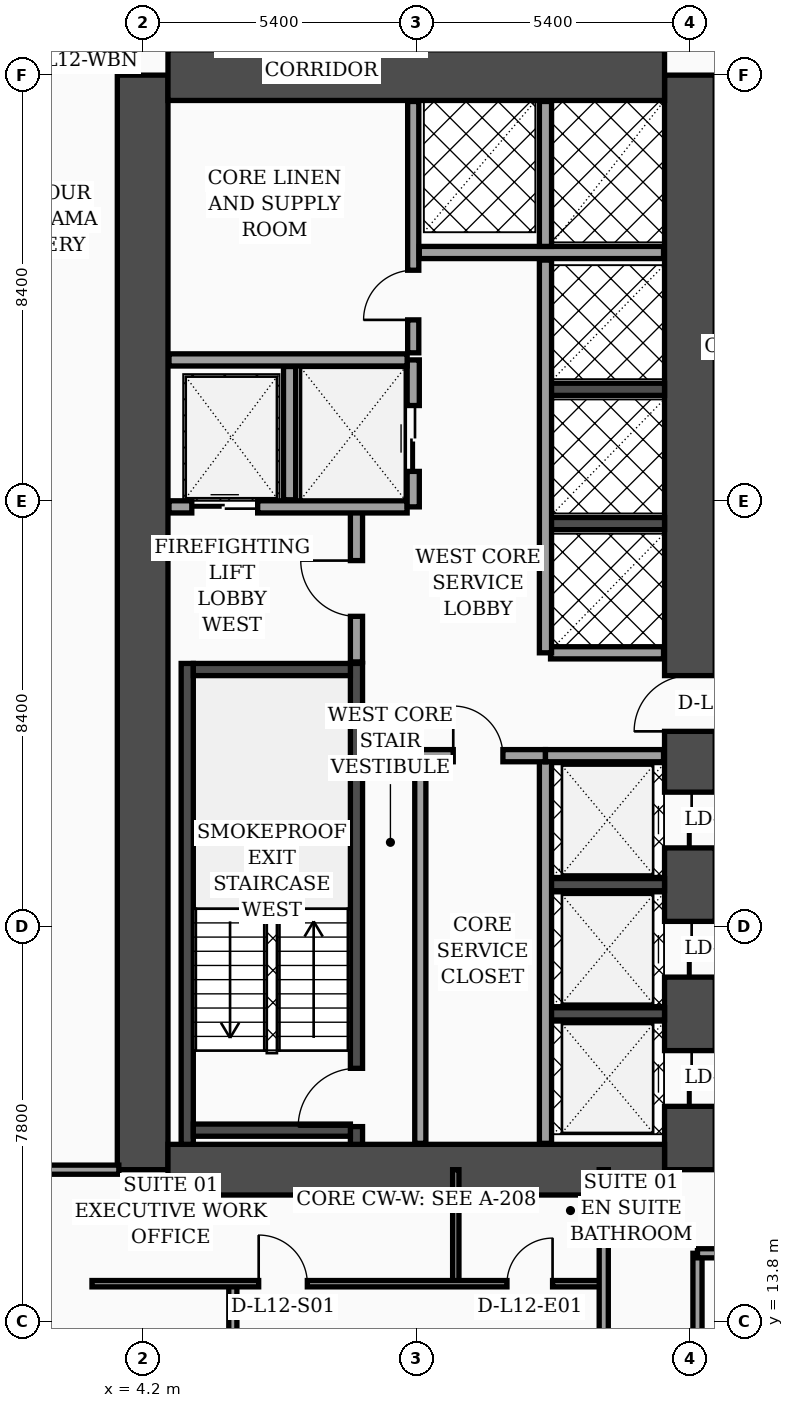
"""IFC4 building model, lengths in metres.
Left out: names, types, materials, properties, quantities, classifications, styles, units other than length and angle.
Written with IfcOpenShell. Run it as: python <this file> out.ifc"""

import sys

from ifc_helpers import new_model, si_unit, direction, frame, frame_2d, origin, place, context, subcontext, project, spatial, rectangle, extrude, element, fill, save


model = new_model("IFC4")
c1 = context("Model", 3, precision=1e-05, world=origin(), true_north=direction((0.0, 1.0)))
c2 = subcontext(c1, "Body", "Model", "MODEL_VIEW")
j1 = project(units=[si_unit("LENGTHUNIT", "METRE"), si_unit("PLANEANGLEUNIT", "RADIAN")], contexts=[c1])
p1 = place(None, origin())
s1 = spatial("IfcSite", under=j1, at=p1, CompositionType="ELEMENT")
p2 = place(p1, origin())
s2 = spatial("IfcBuilding", under=s1, at=p2, CompositionType="ELEMENT")
p3 = place(p2, frame((0.0, 0.0, 54.6)))
s3 = spatial("IfcBuildingStorey", under=s2, at=p3, CompositionType="ELEMENT", Elevation=54.6)
p4 = place(p3, frame((4.2, 16.8, 0.0), z_axis=(0.0, 0.0, 1.0), x_axis=(0.0, 1.0, 0.0)))
e1 = element("IfcWall", 1, at=p4, inside=s3, PredefinedType="SHEAR", context=c2, shape_type="SweptSolid", body=[
    extrude(rectangle(XDim=21.6, YDim=1.0, at=frame_2d((10.8, 0.0))), origin(), (0.0, 0.0, 1.0), 3.56),
])
p5 = place(p3, frame((15.0, 16.8, 0.0), z_axis=(0.0, 0.0, 1.0), x_axis=(0.0, 1.0, 0.0)))
e2 = element("IfcWall", 2, at=p5, inside=s3, PredefinedType="SHEAR", context=c2, shape_type="SweptSolid", body=[
    extrude(rectangle(XDim=21.6, YDim=1.0, at=frame_2d((10.8, 0.0))), origin(), (0.0, 0.0, 1.0), 3.56),
])
p6 = place(p5, frame((8.65, 0.0, 0.0)))
e3 = element("IfcOpeningElement", 3, at=p6, cuts=e2, PredefinedType="OPENING", context=c2, shape_type="SweptSolid", body=[
    extrude(rectangle(XDim=1.1, YDim=2.2, at=frame_2d((0.55, 1.1))), frame((0.0, 0.51, 0.0), z_axis=(0.0, -1.0, 0.0), x_axis=(1.0, 0.0, 0.0)), (0.0, 0.0, 1.0), 1.02),
])
p7 = place(p5, frame((1.25, 0.0, 0.0)))
e4 = element("IfcOpeningElement", 4, at=p7, cuts=e2, PredefinedType="OPENING", context=c2, shape_type="SweptSolid", body=[
    extrude(rectangle(XDim=1.1, YDim=2.2, at=frame_2d((0.55, 1.1))), frame((0.0, 0.51, 0.0), z_axis=(0.0, -1.0, 0.0), x_axis=(1.0, 0.0, 0.0)), (0.0, 0.0, 1.0), 1.02),
])
p8 = place(p5, frame((3.8, 0.0, 0.0)))
e5 = element("IfcOpeningElement", 5, at=p8, cuts=e2, PredefinedType="OPENING", context=c2, shape_type="SweptSolid", body=[
    extrude(rectangle(XDim=1.1, YDim=2.2, at=frame_2d((0.55, 1.1))), frame((0.0, 0.51, 0.0), z_axis=(0.0, -1.0, 0.0), x_axis=(1.0, 0.0, 0.0)), (0.0, 0.0, 1.0), 1.02),
])
p9 = place(p5, frame((6.35, 0.0, 0.0)))
e6 = element("IfcOpeningElement", 6, at=p9, cuts=e2, PredefinedType="OPENING", context=c2, shape_type="SweptSolid", body=[
    extrude(rectangle(XDim=1.1, YDim=2.2, at=frame_2d((0.55, 1.1))), frame((0.0, 0.51, 0.0), z_axis=(0.0, -1.0, 0.0), x_axis=(1.0, 0.0, 0.0)), (0.0, 0.0, 1.0), 1.02),
])
for number, where, z_axis, x_axis in (
    (7, (4.7, 38.4, 0.0), (0.0, 0.0, 1.0), (1.0, 0.0, 0.0)),
    (8, (4.7, 16.8, 0.0), (0.0, 0.0, 1.0), (1.0, 0.0, 0.0)),
):
    element("IfcWall", number, at=place(p3, frame(where, z_axis=z_axis, x_axis=x_axis)), inside=s3, PredefinedType="SHEAR", context=c2, shape_type="SweptSolid", body=[
        extrude(rectangle(XDim=9.8, YDim=1.0, at=frame_2d((4.9, 0.0))), origin(), (0.0, 0.0, 1.0), 3.56),
    ])
p10 = place(p3, frame((5.08, 17.3, 0.0), z_axis=(0.0, 0.0, 1.0), x_axis=(0.0, 1.0, 0.0)))
e9 = element("IfcWall", 9, at=p10, inside=s3, PredefinedType="SOLIDWALL", context=c2, shape_type="SweptSolid", body=[
    extrude(rectangle(XDim=9.49, YDim=0.24, at=frame_2d((4.745, 0.0))), origin(), (0.0, 0.0, 1.0), 3.56),
])
p11 = place(p3, frame((8.42, 17.3, 0.0), z_axis=(0.0, 0.0, 1.0), x_axis=(0.0, 1.0, 0.0)))
e10 = element("IfcWall", 10, at=p11, inside=s3, PredefinedType="SOLIDWALL", context=c2, shape_type="SweptSolid", body=[
    extrude(rectangle(XDim=9.49, YDim=0.24, at=frame_2d((4.745, 0.0))), origin(), (0.0, 0.0, 1.0), 3.56),
])
p12 = place(p11, frame((0.35, 0.0, 0.0)))
e11 = element("IfcOpeningElement", 11, at=p12, cuts=e10, PredefinedType="OPENING", context=c2, shape_type="SweptSolid", body=[
    extrude(rectangle(XDim=1.15, YDim=2.2, at=frame_2d((0.575, 1.1))), frame((0.0, 0.13, 0.0), z_axis=(0.0, -1.0, 0.0), x_axis=(1.0, 0.0, 0.0)), (0.0, 0.0, 1.0), 0.26),
])
for number, where, z_axis, x_axis in (
    (12, (5.2, 17.58, 0.0), (0.0, 0.0, 1.0), (1.0, 0.0, 0.0)),
    (13, (5.2, 26.67, 0.0), (0.0, 0.0, 1.0), (1.0, 0.0, 0.0)),
):
    element("IfcWall", number, at=place(p3, frame(where, z_axis=z_axis, x_axis=x_axis)), inside=s3, PredefinedType="SOLIDWALL", context=c2, shape_type="SweptSolid", body=[
        extrude(rectangle(XDim=3.1, YDim=0.24, at=frame_2d((1.55, 0.0))), origin(), (0.0, 0.0, 1.0), 3.56),
    ])
for number, where, z_axis, x_axis in (
    (14, (12.18, 19.875, 0.0), (0.0, 0.0, 1.0), (1.0, 0.0, 0.0)),
    (15, (12.18, 22.425, 0.0), (0.0, 0.0, 1.0), (1.0, 0.0, 0.0)),
    (16, (12.18, 29.55, 0.0), (0.0, 0.0, 1.0), (1.0, 0.0, 0.0)),
    (17, (12.18, 32.2, 0.0), (0.0, 0.0, 1.0), (1.0, 0.0, 0.0)),
):
    element("IfcWall", number, at=place(p3, frame(where, z_axis=z_axis, x_axis=x_axis)), inside=s3, PredefinedType="SOLIDWALL", context=c2, shape_type="SweptSolid", body=[
        extrude(rectangle(XDim=2.32, YDim=0.24, at=frame_2d((1.16, 0.0))), origin(), (0.0, 0.0, 1.0), 3.56),
    ])
p13 = place(p3, frame((8.42, 26.82, 0.0), z_axis=(0.0, 0.0, 1.0), x_axis=(0.0, 1.0, 0.0)))
e18 = element("IfcWall", 18, at=p13, inside=s3, PredefinedType="SOLIDWALL", context=c2, shape_type="SweptSolid", body=[
    extrude(rectangle(XDim=3.0, YDim=0.24, at=frame_2d((1.5, 0.0))), origin(), (0.0, 0.0, 1.0), 3.56),
])
p14 = place(p13, frame((0.9, 0.0, 0.0)))
e19 = element("IfcOpeningElement", 19, at=p14, cuts=e18, PredefinedType="OPENING", context=c2, shape_type="SweptSolid", body=[
    extrude(rectangle(XDim=1.1, YDim=2.2, at=frame_2d((0.55, 1.1))), frame((0.0, 0.13, 0.0), z_axis=(0.0, -1.0, 0.0), x_axis=(1.0, 0.0, 0.0)), (0.0, 0.0, 1.0), 0.26),
])
p15 = place(p3, frame((4.72, 29.88, 0.0), z_axis=(0.0, 0.0, 1.0), x_axis=(1.0, 0.0, 0.0)))
e20 = element("IfcWall", 20, at=p15, inside=s3, PredefinedType="SOLIDWALL", context=c2, shape_type="SweptSolid", body=[
    extrude(rectangle(XDim=4.7, YDim=0.24, at=frame_2d((2.35, 0.0))), origin(), (0.0, 0.0, 1.0), 3.56),
])
p16 = place(p15, frame((0.45, 0.0, 0.0)))
e21 = element("IfcOpeningElement", 21, at=p16, cuts=e20, PredefinedType="OPENING", context=c2, shape_type="SweptSolid", body=[
    extrude(rectangle(XDim=1.3, YDim=2.35, at=frame_2d((0.65, 1.175))), frame((0.0, 0.13, 0.0), z_axis=(0.0, -1.0, 0.0), x_axis=(1.0, 0.0, 0.0)), (0.0, 0.0, 1.0), 0.26),
])
p17 = place(p3, frame((7.1, 30.02, 0.0), z_axis=(0.0, 0.0, 1.0), x_axis=(0.0, 1.0, 0.0)))
e22 = element("IfcWall", 22, at=p17, inside=s3, PredefinedType="SOLIDWALL", context=c2, shape_type="SweptSolid", body=[
    extrude(rectangle(XDim=2.63, YDim=0.24, at=frame_2d((1.315, 0.0))), origin(), (0.0, 0.0, 1.0), 3.56),
])
p18 = place(p3, frame((9.54, 29.88, 0.0), z_axis=(0.0, 0.0, 1.0), x_axis=(0.0, 1.0, 0.0)))
e23 = element("IfcWall", 23, at=p18, inside=s3, PredefinedType="SOLIDWALL", context=c2, shape_type="SweptSolid", body=[
    extrude(rectangle(XDim=2.9, YDim=0.24, at=frame_2d((1.45, 0.0))), origin(), (0.0, 0.0, 1.0), 3.56),
])
p19 = place(p18, frame((0.7, 0.0, 0.0)))
e24 = element("IfcOpeningElement", 24, at=p19, cuts=e23, PredefinedType="OPENING", context=c2, shape_type="SweptSolid", body=[
    extrude(rectangle(XDim=1.3, YDim=2.35, at=frame_2d((0.65, 1.175))), frame((0.0, 0.13, 0.0), z_axis=(0.0, -1.0, 0.0), x_axis=(1.0, 0.0, 0.0)), (0.0, 0.0, 1.0), 0.26),
])
p20 = place(p3, frame((4.72, 32.78, 0.0), z_axis=(0.0, 0.0, 1.0), x_axis=(1.0, 0.0, 0.0)))
e25 = element("IfcWall", 25, at=p20, inside=s3, PredefinedType="SOLIDWALL", context=c2, shape_type="SweptSolid", body=[
    extrude(rectangle(XDim=4.7, YDim=0.24, at=frame_2d((2.35, 0.0))), origin(), (0.0, 0.0, 1.0), 3.56),
])
p21 = place(p3, frame((9.68, 17.32, 0.0), z_axis=(0.0, 0.0, 1.0), x_axis=(0.0, 1.0, 0.0)))
e26 = element("IfcWall", 26, at=p21, inside=s3, PredefinedType="SOLIDWALL", context=c2, shape_type="SweptSolid", body=[
    extrude(rectangle(XDim=7.68, YDim=0.22, at=frame_2d((3.84, 0.0))), origin(), (0.0, 0.0, 1.0), 3.56),
])
p22 = place(p3, frame((9.54, 32.92, 0.0), z_axis=(0.0, 0.0, 1.0), x_axis=(0.0, 1.0, 0.0)))
e27 = element("IfcWall", 27, at=p22, inside=s3, PredefinedType="SOLIDWALL", context=c2, shape_type="SweptSolid", body=[
    extrude(rectangle(XDim=4.96, YDim=0.22, at=frame_2d((2.48, 0.0))), origin(), (0.0, 0.0, 1.0), 3.56),
])
p23 = place(p22, frame((0.65, 0.0, 0.0)))
e28 = element("IfcOpeningElement", 28, at=p23, cuts=e27, PredefinedType="OPENING", context=c2, shape_type="SweptSolid", body=[
    extrude(rectangle(XDim=0.98, YDim=2.15, at=frame_2d((0.49, 1.075))), frame((0.0, 0.12, 0.0), z_axis=(0.0, -1.0, 0.0), x_axis=(1.0, 0.0, 0.0)), (0.0, 0.0, 1.0), 0.24),
])
p24 = place(p3, frame((12.15, 17.32, 0.0), z_axis=(0.0, 0.0, 1.0), x_axis=(0.0, 1.0, 0.0)))
e29 = element("IfcWall", 29, at=p24, inside=s3, PredefinedType="SOLIDWALL", context=c2, shape_type="SweptSolid", body=[
    extrude(rectangle(XDim=7.65, YDim=0.24, at=frame_2d((3.825, 0.0))), origin(), (0.0, 0.0, 1.0), 3.56),
])
p25 = place(p3, frame((9.68, 24.97, 0.0), z_axis=(0.0, 0.0, 1.0), x_axis=(1.0, 0.0, 0.0)))
e30 = element("IfcWall", 30, at=p25, inside=s3, PredefinedType="SOLIDWALL", context=c2, shape_type="SweptSolid", body=[
    extrude(rectangle(XDim=2.47, YDim=0.24, at=frame_2d((1.235, 0.0))), origin(), (0.0, 0.0, 1.0), 3.56),
])
p26 = place(p25, frame((0.65, 0.0, 0.0)))
e31 = element("IfcOpeningElement", 31, at=p26, cuts=e30, PredefinedType="OPENING", context=c2, shape_type="SweptSolid", body=[
    extrude(rectangle(XDim=0.98, YDim=2.15, at=frame_2d((0.49, 1.075))), frame((0.0, 0.13, 0.0), z_axis=(0.0, -1.0, 0.0), x_axis=(1.0, 0.0, 0.0)), (0.0, 0.0, 1.0), 0.26),
])
p27 = place(p3, frame((12.15, 24.97, 0.0), z_axis=(0.0, 0.0, 1.0), x_axis=(1.0, 0.0, 0.0)))
e32 = element("IfcWall", 32, at=p27, inside=s3, PredefinedType="SOLIDWALL", context=c2, shape_type="SweptSolid", body=[
    extrude(rectangle(XDim=2.33, YDim=0.24, at=frame_2d((1.165, 0.0))), origin(), (0.0, 0.0, 1.0), 2.84),
])
p28 = place(p3, frame((12.25, 27.0, 0.0), z_axis=(0.0, 0.0, 1.0), x_axis=(1.0, 0.0, 0.0)))
e33 = element("IfcWall", 33, at=p28, inside=s3, PredefinedType="SOLIDWALL", context=c2, shape_type="SweptSolid", body=[
    extrude(rectangle(XDim=2.23, YDim=0.24, at=frame_2d((1.115, 0.0))), origin(), (0.0, 0.0, 1.0), 3.56),
])
p29 = place(p3, frame((12.15, 27.0, 0.0), z_axis=(0.0, 0.0, 1.0), x_axis=(0.0, 1.0, 0.0)))
e34 = element("IfcWall", 34, at=p29, inside=s3, PredefinedType="SOLIDWALL", context=c2, shape_type="SweptSolid", body=[
    extrude(rectangle(XDim=7.75, YDim=0.24, at=frame_2d((3.875, 0.0))), origin(), (0.0, 0.0, 1.0), 3.56),
])
p30 = place(p3, frame((9.66, 34.9, 0.0), z_axis=(0.0, 0.0, 1.0), x_axis=(1.0, 0.0, 0.0)))
e35 = element("IfcWall", 35, at=p30, inside=s3, PredefinedType="SOLIDWALL", context=c2, shape_type="SweptSolid", body=[
    extrude(rectangle(XDim=4.82, YDim=0.24, at=frame_2d((2.41, 0.0))), origin(), (0.0, 0.0, 1.0), 3.56),
])
p31 = place(p3, frame((12.15, 35.02, 0.0), z_axis=(0.0, 0.0, 1.0), x_axis=(0.0, 1.0, 0.0)))
e36 = element("IfcWall", 36, at=p31, inside=s3, PredefinedType="SOLIDWALL", context=c2, shape_type="SweptSolid", body=[
    extrude(rectangle(XDim=2.86, YDim=0.24, at=frame_2d((1.43, 0.0))), origin(), (0.0, 0.0, 1.0), 3.56),
])
p32 = place(p3, frame((0.08, 16.8, 0.0), z_axis=(0.0, 0.0, 1.0), x_axis=(1.0, 0.0, 0.0)))
e37 = element("IfcWall", 37, at=p32, inside=s3, PredefinedType="PARTITIONING", context=c2, shape_type="SweptSolid", body=[
    extrude(rectangle(XDim=3.65, YDim=0.18, at=frame_2d((1.825, 0.0))), origin(), (0.0, 0.0, 1.0), 2.84),
])
p33 = place(p3, frame((10.38, 14.55, 0.0), z_axis=(0.0, 0.0, 1.0), x_axis=(0.0, 1.0, 0.0)))
e38 = element("IfcWall", 38, at=p33, inside=s3, PredefinedType="PARTITIONING", context=c2, shape_type="SweptSolid", body=[
    extrude(rectangle(XDim=2.25, YDim=0.125, at=frame_2d((1.125, 0.0))), origin(), (0.0, 0.0, 1.0), 3.56),
])
p34 = place(p3, frame((5.98, 2.44, 0.0), z_axis=(0.0, 0.0, 1.0), x_axis=(0.0, 1.0, 0.0)))
e39 = element("IfcWall", 39, at=p34, inside=s3, PredefinedType="PARTITIONING", context=c2, shape_type="SweptSolid", body=[
    extrude(rectangle(XDim=12.11, YDim=0.16, at=frame_2d((6.055, 0.0))), origin(), (0.0, 0.0, 1.0), 3.04),
])
p35 = place(p34, frame((5.58, 0.0, 0.0)))
e40 = element("IfcOpeningElement", 40, at=p35, cuts=e39, PredefinedType="OPENING", context=c2, shape_type="SweptSolid", body=[
    extrude(rectangle(XDim=0.96, YDim=2.2, at=frame_2d((0.48, 1.1))), frame((0.0, 0.09, 0.0), z_axis=(0.0, -1.0, 0.0), x_axis=(1.0, 0.0, 0.0)), (0.0, 0.0, 1.0), 0.18),
])
p36 = place(p3, frame((3.2, 14.55, 0.0), z_axis=(0.0, 0.0, 1.0), x_axis=(1.0, 0.0, 0.0)))
e41 = element("IfcWall", 41, at=p36, inside=s3, PredefinedType="PARTITIONING", context=c2, shape_type="SweptSolid", body=[
    extrude(rectangle(XDim=10.1, YDim=0.125, at=frame_2d((5.05, 0.0))), origin(), (0.0, 0.0, 1.0), 2.84),
])
p37 = place(p36, frame((3.29, 0.0, 0.0)))
e42 = element("IfcOpeningElement", 42, at=p37, cuts=e41, PredefinedType="OPENING", context=c2, shape_type="SweptSolid", body=[
    extrude(rectangle(XDim=0.96, YDim=2.2, at=frame_2d((0.48, 1.1))), frame((0.0, 0.073, 0.0), z_axis=(0.0, -1.0, 0.0), x_axis=(1.0, 0.0, 0.0)), (0.0, 0.0, 1.0), 0.145),
])
p38 = place(p36, frame((8.19, 0.0, 0.0)))
e43 = element("IfcOpeningElement", 43, at=p38, cuts=e41, PredefinedType="OPENING", context=c2, shape_type="SweptSolid", body=[
    extrude(rectangle(XDim=0.9, YDim=2.15, at=frame_2d((0.45, 1.075))), frame((0.0, 0.073, 0.0), z_axis=(0.0, -1.0, 0.0), x_axis=(1.0, 0.0, 0.0)), (0.0, 0.0, 1.0), 0.145),
])
p39 = place(p3, frame((13.3, 2.44, 0.0), z_axis=(0.0, 0.0, 1.0), x_axis=(0.0, 1.0, 0.0)))
e44 = element("IfcWall", 44, at=p39, inside=s3, PredefinedType="PARTITIONING", context=c2, shape_type="SweptSolid", body=[
    extrude(rectangle(XDim=14.36, YDim=0.18, at=frame_2d((7.18, 0.0))), origin(), (0.0, 0.0, 1.0), 3.04),
])
p40 = place(p39, frame((3.01, 0.0, 0.0)))
e45 = element("IfcOpeningElement", 45, at=p40, cuts=e44, PredefinedType="OPENING", context=c2, shape_type="SweptSolid", body=[
    extrude(rectangle(XDim=1.02, YDim=2.2, at=frame_2d((0.51, 1.1))), frame((0.0, 0.1, 0.0), z_axis=(0.0, -1.0, 0.0), x_axis=(1.0, 0.0, 0.0)), (0.0, 0.0, 1.0), 0.2),
])
p41 = place(p3, frame((15.15, 2.44, 0.0), z_axis=(0.0, 0.0, 1.0), x_axis=(0.0, 1.0, 0.0)))
e46 = element("IfcWall", 46, at=p41, inside=s3, PredefinedType="PARTITIONING", context=c2, shape_type="SweptSolid", body=[
    extrude(rectangle(XDim=12.71, YDim=0.18, at=frame_2d((6.355, 0.0))), origin(), (0.0, 0.0, 1.0), 3.04),
])
p42 = place(p3, frame((15.15, 15.15, 0.0), z_axis=(0.0, 0.0, 1.0), x_axis=(1.0, 0.0, 0.0)))
e47 = element("IfcWall", 47, at=p42, inside=s3, PredefinedType="PARTITIONING", context=c2, shape_type="SweptSolid", body=[
    extrude(rectangle(XDim=6.45, YDim=0.18, at=frame_2d((3.225, 0.0))), origin(), (0.0, 0.0, 1.0), 2.34),
])
p43 = place(p42, frame((1.74, 0.0, 0.0)))
e48 = element("IfcOpeningElement", 48, at=p43, cuts=e47, PredefinedType="OPENING", context=c2, shape_type="SweptSolid", body=[
    extrude(rectangle(XDim=1.02, YDim=2.2, at=frame_2d((0.51, 1.1))), frame((0.0, 0.1, 0.0), z_axis=(0.0, -1.0, 0.0), x_axis=(1.0, 0.0, 0.0)), (0.0, 0.0, 1.0), 0.2),
])
p44 = place(p14, origin())
e49 = element("IfcDoor", 49, at=p44, inside=s3, OperationType="SINGLE_SWING_RIGHT", PredefinedType="DOOR", context=c2, shape_type="SweptSolid", body=[
    extrude(rectangle(XDim=1.1, YDim=2.2, at=frame_2d((0.55, 1.1))), frame((0.0, 0.025, 0.0), z_axis=(0.0, -1.0, 0.0), x_axis=(1.0, 0.0, 0.0)), (0.0, 0.0, 1.0), 0.05),
])
fill(e19, e49)
p45 = place(p16, origin())
e50 = element("IfcDoor", 50, at=p45, inside=s3, OperationType="DOUBLE_DOOR_SLIDING", PredefinedType="DOOR", context=c2, shape_type="SweptSolid", body=[
    extrude(rectangle(XDim=1.3, YDim=2.35, at=frame_2d((0.65, 1.175))), frame((0.0, 0.025, 0.0), z_axis=(0.0, -1.0, 0.0), x_axis=(1.0, 0.0, 0.0)), (0.0, 0.0, 1.0), 0.05),
])
fill(e21, e50)
p46 = place(p19, origin())
e51 = element("IfcDoor", 51, at=p46, inside=s3, OperationType="DOUBLE_DOOR_SLIDING", PredefinedType="DOOR", context=c2, shape_type="SweptSolid", body=[
    extrude(rectangle(XDim=1.3, YDim=2.35, at=frame_2d((0.65, 1.175))), frame((0.0, 0.025, 0.0), z_axis=(0.0, -1.0, 0.0), x_axis=(1.0, 0.0, 0.0)), (0.0, 0.0, 1.0), 0.05),
])
fill(e24, e51)
p47 = place(p23, origin())
e52 = element("IfcDoor", 52, at=p47, inside=s3, OperationType="SINGLE_SWING_LEFT", PredefinedType="DOOR", context=c2, shape_type="SweptSolid", body=[
    extrude(rectangle(XDim=0.98, YDim=2.15, at=frame_2d((0.49, 1.075))), frame((0.0, 0.025, 0.0), z_axis=(0.0, -1.0, 0.0), x_axis=(1.0, 0.0, 0.0)), (0.0, 0.0, 1.0), 0.05),
])
fill(e28, e52)
p48 = place(p26, origin())
e53 = element("IfcDoor", 53, at=p48, inside=s3, OperationType="SINGLE_SWING_LEFT", PredefinedType="DOOR", context=c2, shape_type="SweptSolid", body=[
    extrude(rectangle(XDim=0.98, YDim=2.15, at=frame_2d((0.49, 1.075))), frame((0.0, 0.025, 0.0), z_axis=(0.0, -1.0, 0.0), x_axis=(1.0, 0.0, 0.0)), (0.0, 0.0, 1.0), 0.05),
])
fill(e31, e53)
p49 = place(p37, origin())
e54 = element("IfcDoor", 54, at=p49, inside=s3, OperationType="SINGLE_SWING_LEFT", PredefinedType="DOOR", context=c2, shape_type="SweptSolid", body=[
    extrude(rectangle(XDim=0.96, YDim=2.2, at=frame_2d((0.48, 1.1))), frame((0.0, 0.025, 0.0), z_axis=(0.0, -1.0, 0.0), x_axis=(1.0, 0.0, 0.0)), (0.0, 0.0, 1.0), 0.05),
])
fill(e42, e54)
p50 = place(p38, origin())
e55 = element("IfcDoor", 55, at=p50, inside=s3, OperationType="SINGLE_SWING_RIGHT", PredefinedType="DOOR", context=c2, shape_type="SweptSolid", body=[
    extrude(rectangle(XDim=0.9, YDim=2.15, at=frame_2d((0.45, 1.075))), frame((0.0, 0.025, 0.0), z_axis=(0.0, -1.0, 0.0), x_axis=(1.0, 0.0, 0.0)), (0.0, 0.0, 1.0), 0.05),
])
fill(e43, e55)
p51 = place(p12, origin())
e56 = element("IfcDoor", 56, at=p51, inside=s3, OperationType="SINGLE_SWING_LEFT", PredefinedType="DOOR", context=c2, shape_type="SweptSolid", body=[
    extrude(rectangle(XDim=1.15, YDim=2.2, at=frame_2d((0.575, 1.1))), frame((0.0, 0.025, 0.0), z_axis=(0.0, -1.0, 0.0), x_axis=(1.0, 0.0, 0.0)), (0.0, 0.0, 1.0), 0.05),
])
fill(e11, e56)
p52 = place(p6, origin())
e57 = element("IfcDoor", 57, at=p52, inside=s3, OperationType="SINGLE_SWING_LEFT", PredefinedType="DOOR", context=c2, shape_type="SweptSolid", body=[
    extrude(rectangle(XDim=1.1, YDim=2.2, at=frame_2d((0.55, 1.1))), frame((0.0, 0.025, 0.0), z_axis=(0.0, -1.0, 0.0), x_axis=(1.0, 0.0, 0.0)), (0.0, 0.0, 1.0), 0.05),
])
fill(e3, e57)
p53 = place(p7, origin())
e58 = element("IfcDoor", 58, at=p53, inside=s3, OperationType="DOUBLE_DOOR_SLIDING", PredefinedType="DOOR", context=c2, shape_type="SweptSolid", body=[
    extrude(rectangle(XDim=1.1, YDim=2.2, at=frame_2d((0.55, 1.1))), frame((0.0, 0.025, 0.0), z_axis=(0.0, -1.0, 0.0), x_axis=(1.0, 0.0, 0.0)), (0.0, 0.0, 1.0), 0.05),
])
fill(e4, e58)
p54 = place(p8, origin())
e59 = element("IfcDoor", 59, at=p54, inside=s3, OperationType="DOUBLE_DOOR_SLIDING", PredefinedType="DOOR", context=c2, shape_type="SweptSolid", body=[
    extrude(rectangle(XDim=1.1, YDim=2.2, at=frame_2d((0.55, 1.1))), frame((0.0, 0.025, 0.0), z_axis=(0.0, -1.0, 0.0), x_axis=(1.0, 0.0, 0.0)), (0.0, 0.0, 1.0), 0.05),
])
fill(e5, e59)
p55 = place(p9, origin())
e60 = element("IfcDoor", 60, at=p55, inside=s3, OperationType="DOUBLE_DOOR_SLIDING", PredefinedType="DOOR", context=c2, shape_type="SweptSolid", body=[
    extrude(rectangle(XDim=1.1, YDim=2.2, at=frame_2d((0.55, 1.1))), frame((0.0, 0.025, 0.0), z_axis=(0.0, -1.0, 0.0), x_axis=(1.0, 0.0, 0.0)), (0.0, 0.0, 1.0), 0.05),
])
fill(e6, e60)
save(model, sys.argv[1])
